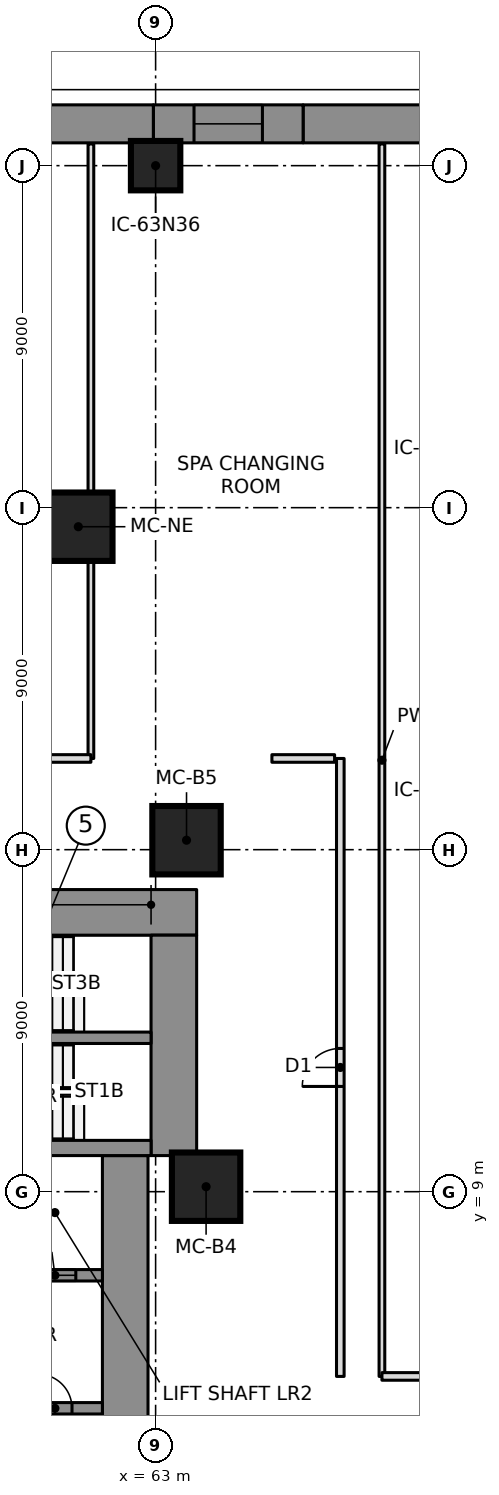
"""IFC4 building model, lengths in metres.
Left out: names, types, materials, properties, quantities, classifications, styles, units other than length and angle.
Written with IfcOpenShell. Run it as: python <this file> out.ifc"""

import sys

from ifc_helpers import new_model, si_unit, direction, frame, frame_2d, origin, origin_2d, place, context, subcontext, project, spatial, polyline, rectangle, outline, extrude, element, fill, save


model = new_model("IFC4")
c1 = context("Model", 3, precision=1e-05, world=origin(), true_north=direction((0.0, 1.0)))
c2 = subcontext(c1, "Body", "Model", "MODEL_VIEW")
j1 = project(units=[si_unit("LENGTHUNIT", "METRE"), si_unit("PLANEANGLEUNIT", "RADIAN")], contexts=[c1])
p1 = place(None, origin())
s1 = spatial("IfcSite", under=j1, at=p1, CompositionType="ELEMENT")
p2 = place(p1, origin())
s2 = spatial("IfcBuilding", under=s1, at=p2, CompositionType="ELEMENT")
p3 = place(p2, frame((0.0, 0.0, 19.0)))
s3 = spatial("IfcBuildingStorey", under=s2, at=p3, CompositionType="ELEMENT", Elevation=19.0)
p4 = place(p3, frame((50.7, 16.35, 0.0), z_axis=(0.0, 0.0, 1.0), x_axis=(1.0, 0.0, 0.0)))
e1 = element("IfcWall", 1, at=p4, inside=s3, PredefinedType="SHEAR", context=c2, shape_type="SweptSolid", body=[
    extrude(rectangle(XDim=13.38, YDim=1.2, at=frame_2d((6.69, 0.0))), origin(), (0.0, 0.0, 1.0), 5.0),
])
p5 = place(p3, frame((63.48, 9.95, 0.0), z_axis=(0.0, 0.0, 1.0), x_axis=(0.0, 1.0, 0.0)))
e2 = element("IfcWall", 2, at=p5, inside=s3, PredefinedType="SHEAR", context=c2, shape_type="SweptSolid", body=[
    extrude(rectangle(XDim=5.8, YDim=1.2, at=frame_2d((2.9, 0.0))), origin(), (0.0, 0.0, 1.0), 5.0),
])
p6 = place(p3, frame((62.2, -9.95, 0.0), z_axis=(0.0, 0.0, 1.0), x_axis=(0.0, 1.0, 0.0)))
e3 = element("IfcWall", 3, at=p6, inside=s3, PredefinedType="SHEAR", context=c2, shape_type="SweptSolid", body=[
    extrude(rectangle(XDim=19.9, YDim=1.2, at=frame_2d((9.95, 0.0))), origin(), (0.0, 0.0, 1.0), 5.0),
])
p7 = place(p3, frame((50.7, 10.15, 0.0), z_axis=(0.0, 0.0, 1.0), x_axis=(1.0, 0.0, 0.0)))
e4 = element("IfcWall", 4, at=p7, inside=s3, PredefinedType="SHEAR", context=c2, shape_type="SweptSolid", body=[
    extrude(rectangle(XDim=12.18, YDim=0.4, at=frame_2d((6.09, 0.0))), origin(), (0.0, 0.0, 1.0), 5.0),
])
p8 = place(p7, frame((0.7, 0.0, 0.0)))
e5 = element("IfcOpeningElement", 5, at=p8, cuts=e4, PredefinedType="OPENING", context=c2, shape_type="SweptSolid", body=[
    extrude(rectangle(XDim=1.1, YDim=2.1, at=frame_2d((0.55, 1.05))), frame((0.0, 0.21, 0.0), z_axis=(0.0, -1.0, 0.0), x_axis=(1.0, 0.0, 0.0)), (0.0, 0.0, 1.0), 0.42),
])
p9 = place(p7, frame((3.5, 0.0, 0.0)))
e6 = element("IfcOpeningElement", 6, at=p9, cuts=e4, PredefinedType="OPENING", context=c2, shape_type="SweptSolid", body=[
    extrude(rectangle(XDim=1.1, YDim=2.1, at=frame_2d((0.55, 1.05))), frame((0.0, 0.21, 0.0), z_axis=(0.0, -1.0, 0.0), x_axis=(1.0, 0.0, 0.0)), (0.0, 0.0, 1.0), 0.42),
])
p10 = place(p3, frame((50.7, 3.3, 0.0), z_axis=(0.0, 0.0, 1.0), x_axis=(1.0, 0.0, 0.0)))
e7 = element("IfcWall", 7, at=p10, inside=s3, PredefinedType="SHEAR", context=c2, shape_type="SweptSolid", body=[
    extrude(rectangle(XDim=10.9, YDim=0.3, at=frame_2d((5.45, 0.0))), origin(), (0.0, 0.0, 1.0), 5.0),
])
p11 = place(p10, frame((0.8, 0.0, 0.0)))
e8 = element("IfcOpeningElement", 8, at=p11, cuts=e7, PredefinedType="OPENING", context=c2, shape_type="SweptSolid", body=[
    extrude(rectangle(XDim=0.9, YDim=2.1, at=frame_2d((0.45, 1.05))), frame((0.0, 0.16, 0.0), z_axis=(0.0, -1.0, 0.0), x_axis=(1.0, 0.0, 0.0)), (0.0, 0.0, 1.0), 0.32),
])
p12 = place(p10, frame((3.6, 0.0, 0.0)))
e9 = element("IfcOpeningElement", 9, at=p12, cuts=e7, PredefinedType="OPENING", context=c2, shape_type="SweptSolid", body=[
    extrude(rectangle(XDim=0.9, YDim=2.1, at=frame_2d((0.45, 1.05))), frame((0.0, 0.16, 0.0), z_axis=(0.0, -1.0, 0.0), x_axis=(1.0, 0.0, 0.0)), (0.0, 0.0, 1.0), 0.32),
])
p13 = place(p10, frame((6.4, 0.0, 0.0)))
e10 = element("IfcOpeningElement", 10, at=p13, cuts=e7, PredefinedType="OPENING", context=c2, shape_type="SweptSolid", body=[
    extrude(rectangle(XDim=0.9, YDim=2.1, at=frame_2d((0.45, 1.05))), frame((0.0, 0.16, 0.0), z_axis=(0.0, -1.0, 0.0), x_axis=(1.0, 0.0, 0.0)), (0.0, 0.0, 1.0), 0.32),
])
p14 = place(p10, frame((9.2, 0.0, 0.0)))
e11 = element("IfcOpeningElement", 11, at=p14, cuts=e7, PredefinedType="OPENING", context=c2, shape_type="SweptSolid", body=[
    extrude(rectangle(XDim=0.9, YDim=2.1, at=frame_2d((0.45, 1.05))), frame((0.0, 0.16, 0.0), z_axis=(0.0, -1.0, 0.0), x_axis=(1.0, 0.0, 0.0)), (0.0, 0.0, 1.0), 0.32),
])
p15 = place(p3, frame((50.7, 6.8, 0.0), z_axis=(0.0, 0.0, 1.0), x_axis=(1.0, 0.0, 0.0)))
e12 = element("IfcWall", 12, at=p15, inside=s3, PredefinedType="SHEAR", context=c2, shape_type="SweptSolid", body=[
    extrude(rectangle(XDim=10.9, YDim=0.3, at=frame_2d((5.45, 0.0))), origin(), (0.0, 0.0, 1.0), 5.0),
])
p16 = place(p15, frame((6.3, 0.0, 0.0)))
e13 = element("IfcOpeningElement", 13, at=p16, cuts=e12, PredefinedType="OPENING", context=c2, shape_type="SweptSolid", body=[
    extrude(rectangle(XDim=1.1, YDim=2.1, at=frame_2d((0.55, 1.05))), frame((0.0, 0.16, 0.0), z_axis=(0.0, -1.0, 0.0), x_axis=(1.0, 0.0, 0.0)), (0.0, 0.0, 1.0), 0.32),
])
p17 = place(p15, frame((9.1, 0.0, 0.0)))
e14 = element("IfcOpeningElement", 14, at=p17, cuts=e12, PredefinedType="OPENING", context=c2, shape_type="SweptSolid", body=[
    extrude(rectangle(XDim=1.1, YDim=2.1, at=frame_2d((0.55, 1.05))), frame((0.0, 0.16, 0.0), z_axis=(0.0, -1.0, 0.0), x_axis=(1.0, 0.0, 0.0)), (0.0, 0.0, 1.0), 0.32),
])
p18 = place(p3, frame((56.0, 13.05, 0.0), z_axis=(0.0, 0.0, 1.0), x_axis=(1.0, 0.0, 0.0)))
e15 = element("IfcWall", 15, at=p18, inside=s3, PredefinedType="SHEAR", context=c2, shape_type="SweptSolid", body=[
    extrude(rectangle(XDim=6.88, YDim=0.3, at=frame_2d((3.44, 0.0))), origin(), (0.0, 0.0, 1.0), 5.0),
])
for number, where, z_axis, x_axis in (
    (16, (64.328, 9.131, 0.0), (0.0, 0.0, 1.0), (1.0, 0.0, 0.0)),
    (17, (63.813, 18.249, 0.0), (0.0, 0.0, 1.0), (1.0, 0.0, 0.0)),
    (18, (60.966, 26.499, 0.0), (0.0, 0.0, 1.0), (1.0, 0.0, 0.0)),
):
    element("IfcColumn", number, at=place(p3, frame(where, z_axis=z_axis, x_axis=x_axis)), inside=s3, PredefinedType="COLUMN", context=c2, shape_type="SweptSolid", body=[
        extrude(rectangle(XDim=1.8, YDim=1.8, at=origin_2d()), origin(), (0.0, 0.0, 1.0), 5.0),
    ])
p19 = place(p3, frame((63.0, 36.0, 0.0), z_axis=(0.0, 0.0, 1.0), x_axis=(1.0, 0.0, 0.0)))
e19 = element("IfcColumn", 19, at=p19, inside=s3, PredefinedType="COLUMN", context=c2, shape_type="SweptSolid", body=[
    extrude(rectangle(XDim=1.3, YDim=1.3, at=origin_2d()), origin(), (0.0, 0.0, 1.0), 5.0),
])
p20 = place(p3, frame((70.821, 37.1, 0.0), z_axis=(0.0, 0.0, 1.0), x_axis=(-1.0, 0.0, 0.0)))
e20 = element("IfcWall", 20, at=p20, inside=s3, PredefinedType="NOTDEFINED", context=c2, shape_type="SweptSolid", body=[
    extrude(outline(polyline([(-0.1, -0.5), (3.94, -0.5), (3.94, 0.5), (0.1, 0.5), (-0.1, -0.5)])), origin(), (0.0, 0.0, 1.0), 4.7),
])
p21 = place(p3, frame((66.881, 37.1, 0.0), z_axis=(0.0, 0.0, 1.0), x_axis=(-1.0, 0.0, 0.0)))
e21 = element("IfcWall", 21, at=p21, inside=s3, PredefinedType="NOTDEFINED", context=c2, shape_type="SweptSolid", body=[
    extrude(outline(polyline([(0.0, -0.5), (3.94, -0.5), (3.94, 0.5), (0.0, 0.5), (0.0, -0.5)])), origin(), (0.0, 0.0, 1.0), 4.7),
])
p22 = place(p21, frame((1.07, 0.0, 0.9)))
e22 = element("IfcOpeningElement", 22, at=p22, cuts=e21, PredefinedType="OPENING", context=c2, shape_type="SweptSolid", body=[
    extrude(rectangle(XDim=1.8, YDim=2.4, at=frame_2d((0.9, 1.2))), frame((0.0, 0.51, 0.0), z_axis=(0.0, -1.0, 0.0), x_axis=(1.0, 0.0, 0.0)), (0.0, 0.0, 1.0), 1.02),
])
p23 = place(p3, frame((62.94, 37.1, 0.0), z_axis=(0.0, 0.0, 1.0), x_axis=(-1.0, 0.0, 0.0)))
e23 = element("IfcWall", 23, at=p23, inside=s3, PredefinedType="NOTDEFINED", context=c2, shape_type="SweptSolid", body=[
    extrude(outline(polyline([(0.0, -0.5), (3.94, -0.5), (3.94, 0.5), (0.0, 0.5), (0.0, -0.5)])), origin(), (0.0, 0.0, 1.0), 4.7),
])
p24 = place(p3, frame((61.297, 20.4, 0.0), z_axis=(0.0, 0.0, 1.0), x_axis=(0.0, 1.0, 0.0)))
e24 = element("IfcWall", 24, at=p24, inside=s3, PredefinedType="PARTITIONING", context=c2, shape_type="SweptSolid", body=[
    extrude(rectangle(XDim=16.17, YDim=0.15, at=frame_2d((8.085, 0.0))), origin(), (0.0, 0.0, 1.0), 4.65),
])
p25 = place(p3, frame((68.955, 4.139, 0.0), z_axis=(0.0, 0.0, 1.0), x_axis=(0.0, 1.0, 0.0)))
e25 = element("IfcWall", 25, at=p25, inside=s3, PredefinedType="PARTITIONING", context=c2, shape_type="SweptSolid", body=[
    extrude(rectangle(XDim=32.431, YDim=0.15, at=frame_2d((16.216, 0.0))), origin(), (0.0, 0.0, 1.0), 4.65),
])
p26 = place(p3, frame((68.955, 4.139, 0.0), z_axis=(0.0, 0.0, 1.0), x_axis=(1.0, 0.0, 0.0)))
e26 = element("IfcWall", 26, at=p26, inside=s3, PredefinedType="PARTITIONING", context=c2, shape_type="SweptSolid", body=[
    extrude(rectangle(XDim=3.676, YDim=0.2, at=frame_2d((1.838, 0.0))), origin(), (0.0, 0.0, 1.0), 4.65),
])
p27 = place(p26, frame((1.338, 0.0, 0.0)))
e27 = element("IfcOpeningElement", 27, at=p27, cuts=e26, PredefinedType="OPENING", context=c2, shape_type="SweptSolid", body=[
    extrude(rectangle(XDim=1.0, YDim=2.1, at=frame_2d((0.5, 1.05))), frame((0.0, 0.11, 0.0), z_axis=(0.0, -1.0, 0.0), x_axis=(1.0, 0.0, 0.0)), (0.0, 0.0, 1.0), 0.22),
])
p28 = place(p3, frame((61.297, 20.4, 0.0), z_axis=(0.0, 0.0, 1.0), x_axis=(-1.0, 0.0, 0.0)))
e28 = element("IfcWall", 28, at=p28, inside=s3, PredefinedType="PARTITIONING", context=c2, shape_type="SweptSolid", body=[
    extrude(rectangle(XDim=10.108, YDim=0.2, at=frame_2d((5.054, 0.0))), origin(), (0.0, 0.0, 1.0), 4.65),
])
p29 = place(p28, frame((4.554, 0.0, 0.0)))
e29 = element("IfcOpeningElement", 29, at=p29, cuts=e28, PredefinedType="OPENING", context=c2, shape_type="SweptSolid", body=[
    extrude(rectangle(XDim=1.0, YDim=2.1, at=frame_2d((0.5, 1.05))), frame((0.0, 0.11, 0.0), z_axis=(0.0, -1.0, 0.0), x_axis=(1.0, 0.0, 0.0)), (0.0, 0.0, 1.0), 0.22),
])
p30 = place(p3, frame((67.86, 4.139, 0.0), z_axis=(0.0, 0.0, 1.0), x_axis=(0.0, 1.0, 0.0)))
e30 = element("IfcWall", 30, at=p30, inside=s3, PredefinedType="PARTITIONING", context=c2, shape_type="SweptSolid", body=[
    extrude(rectangle(XDim=16.261, YDim=0.2, at=frame_2d((8.131, 0.0))), origin(), (0.0, 0.0, 1.0), 4.65),
])
p31 = place(p30, frame((7.631, 0.0, 0.0)))
e31 = element("IfcOpeningElement", 31, at=p31, cuts=e30, PredefinedType="OPENING", context=c2, shape_type="SweptSolid", body=[
    extrude(rectangle(XDim=1.0, YDim=2.1, at=frame_2d((0.5, 1.05))), frame((0.0, 0.11, 0.0), z_axis=(0.0, -1.0, 0.0), x_axis=(1.0, 0.0, 0.0)), (0.0, 0.0, 1.0), 0.22),
])
p32 = place(p3, frame((66.06, 20.4, 0.0), z_axis=(0.0, 0.0, 1.0), x_axis=(1.0, 0.0, 0.0)))
e32 = element("IfcWall", 32, at=p32, inside=s3, PredefinedType="PARTITIONING", context=c2, shape_type="SweptSolid", body=[
    extrude(rectangle(XDim=1.65, YDim=0.2, at=frame_2d((0.825, 0.0))), origin(), (0.0, 0.0, 1.0), 4.65),
])
p33 = place(p22, origin())
e33 = element("IfcWindow", 33, at=p33, inside=s3, PartitioningType="SINGLE_PANEL", PredefinedType="WINDOW", context=c2, shape_type="SweptSolid", body=[
    extrude(rectangle(XDim=1.8, YDim=2.4, at=frame_2d((0.9, 1.2))), frame((0.0, 0.5, 0.0), z_axis=(0.0, -1.0, 0.0), x_axis=(1.0, 0.0, 0.0)), (0.0, 0.0, 1.0), 0.06),
])
fill(e22, e33)
p34 = place(p31, origin())
e34 = element("IfcDoor", 34, at=p34, inside=s3, OperationType="SINGLE_SWING_LEFT", PredefinedType="DOOR", context=c2, shape_type="SweptSolid", body=[
    extrude(rectangle(XDim=1.0, YDim=2.1, at=frame_2d((0.5, 1.05))), frame((0.0, 0.025, 0.0), z_axis=(0.0, -1.0, 0.0), x_axis=(1.0, 0.0, 0.0)), (0.0, 0.0, 1.0), 0.05),
])
fill(e31, e34)
p35 = place(p17, origin())
e35 = element("IfcDoor", 35, at=p35, inside=s3, OperationType="DOUBLE_DOOR_SLIDING", PredefinedType="DOOR", context=c2, shape_type="SweptSolid", body=[
    extrude(rectangle(XDim=1.1, YDim=2.1, at=frame_2d((0.55, 1.05))), frame((0.0, 0.025, 0.0), z_axis=(0.0, -1.0, 0.0), x_axis=(1.0, 0.0, 0.0)), (0.0, 0.0, 1.0), 0.05),
])
fill(e14, e35)
p36 = place(p14, origin())
e36 = element("IfcDoor", 36, at=p36, inside=s3, OperationType="SINGLE_SWING_LEFT", PredefinedType="DOOR", context=c2, shape_type="SweptSolid", body=[
    extrude(rectangle(XDim=0.9, YDim=2.1, at=frame_2d((0.45, 1.05))), frame((0.0, 0.025, 0.0), z_axis=(0.0, -1.0, 0.0), x_axis=(1.0, 0.0, 0.0)), (0.0, 0.0, 1.0), 0.05),
])
fill(e11, e36)
save(model, sys.argv[1])
